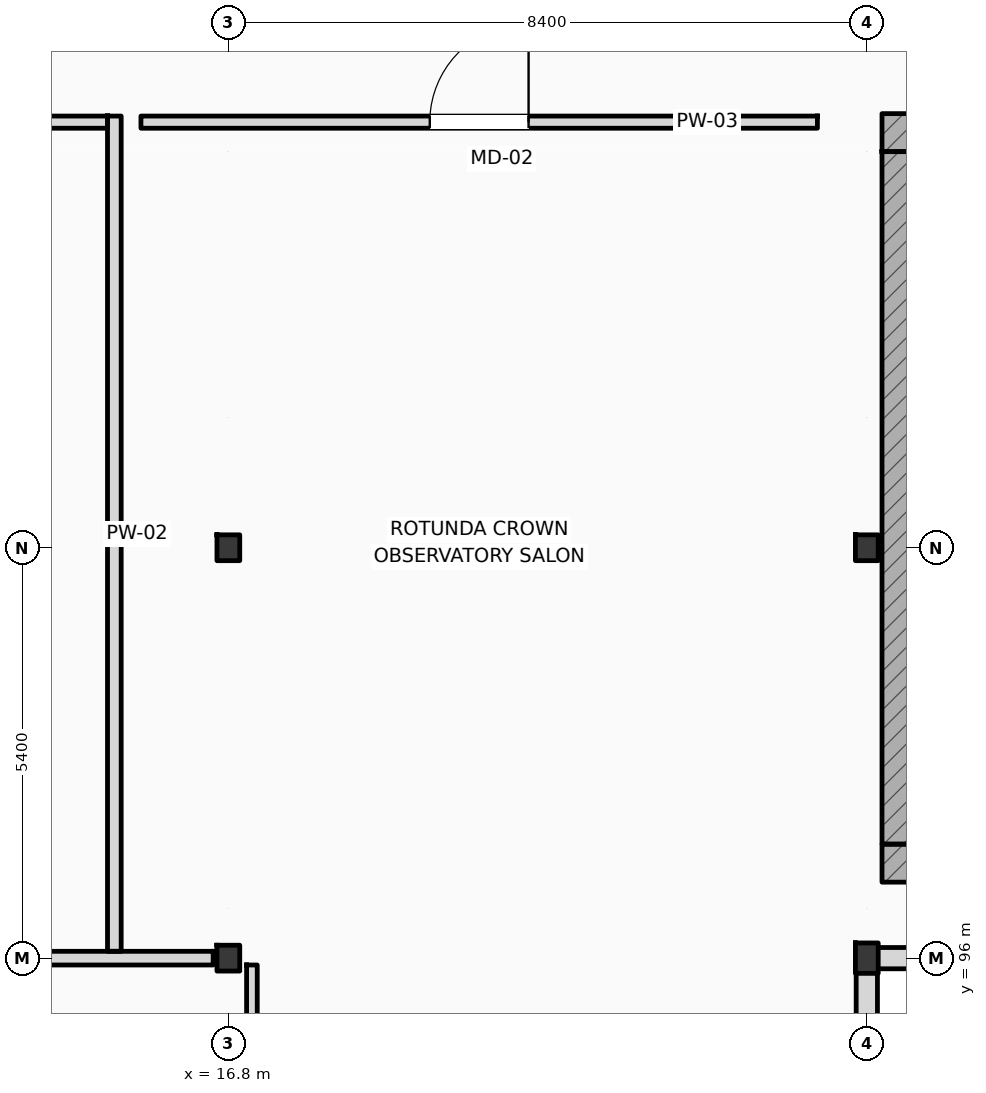
"""IFC4 building model, lengths in metres.
Left out: names, types, materials, properties, quantities, classifications, styles, units other than length and angle.
Written with IfcOpenShell. Run it as: python <this file> out.ifc"""

import sys

from ifc_helpers import new_model, si_unit, direction, frame, frame_2d, origin, origin_2d, place, context, subcontext, project, spatial, rectangle, i_section, extrude, element, fill, save


model = new_model("IFC4")
c1 = context("Model", 3, precision=1e-05, world=origin(), true_north=direction((0.0, 1.0)))
c2 = subcontext(c1, "Body", "Model", "MODEL_VIEW")
j1 = project(units=[si_unit("LENGTHUNIT", "METRE"), si_unit("PLANEANGLEUNIT", "RADIAN")], contexts=[c1])
p1 = place(None, origin())
s1 = spatial("IfcSite", under=j1, at=p1, CompositionType="ELEMENT")
p2 = place(p1, origin())
s2 = spatial("IfcBuilding", under=s1, at=p2, CompositionType="ELEMENT")
p3 = place(p2, frame((0.0, 0.0, 46.8)))
s3 = spatial("IfcBuildingStorey", under=s2, at=p3, CompositionType="ELEMENT", Elevation=46.8)
p4 = place(p3, frame((16.8, 96.0, 0.0), z_axis=(0.0, 0.0, 1.0), x_axis=(1.0, 0.0, 0.0)))
e1 = element("IfcColumn", 1, at=p4, inside=s3, PredefinedType="COLUMN", context=c2, shape_type="SweptSolid", body=[
    extrude(i_section(OverallWidth=0.3, OverallDepth=0.34, WebThickness=0.012, FlangeThickness=0.021, FilletRadius=0.027, at=origin_2d()), origin(), (0.0, 0.0, 1.0), 4.8),
])
p5 = place(p3, frame((25.2, 96.0, 0.0), z_axis=(0.0, 0.0, 1.0), x_axis=(1.0, 0.0, 0.0)))
e2 = element("IfcColumn", 2, at=p5, inside=s3, PredefinedType="COLUMN", context=c2, shape_type="SweptSolid", body=[
    extrude(i_section(OverallWidth=0.3, OverallDepth=0.4, WebThickness=0.013, FlangeThickness=0.024, FilletRadius=0.027, at=origin_2d()), origin(), (0.0, 0.0, 1.0), 4.8),
])
for number, where, z_axis, x_axis in (
    (3, (16.8, 101.4, 0.0), (0.0, 0.0, 1.0), (1.0, 0.0, 0.0)),
    (4, (25.2, 101.4, 0.0), (0.0, 0.0, 1.0), (1.0, 0.0, 0.0)),
):
    element("IfcColumn", number, at=place(p3, frame(where, z_axis=z_axis, x_axis=x_axis)), inside=s3, PredefinedType="COLUMN", context=c2, shape_type="SweptSolid", body=[
        extrude(i_section(OverallWidth=0.3, OverallDepth=0.34, WebThickness=0.012, FlangeThickness=0.021, FilletRadius=0.027, at=origin_2d()), origin(), (0.0, 0.0, 1.0), 4.8),
    ])
for number, where, z_axis, x_axis in (
    (5, (25.4, 106.862, 0.0), (0.0, 0.0, 1.0), (1.0, 0.0, 0.0)),
    (6, (25.4, 97.25, 0.0), (0.0, 0.0, 1.0), (1.0, 0.0, 0.0)),
):
    element("IfcWall", number, at=place(p3, frame(where, z_axis=z_axis, x_axis=x_axis)), inside=s3, PredefinedType="SHEAR", context=c2, shape_type="SweptSolid", body=[
        extrude(rectangle(XDim=5.16, YDim=0.5, at=frame_2d((2.58, 0.0))), origin(), (0.0, 0.0, 1.0), 4.8),
    ])
p6 = place(p3, frame((25.65, 97.5, 0.0), z_axis=(0.0, 0.0, 1.0), x_axis=(0.0, 1.0, 0.0)))
e7 = element("IfcWall", 7, at=p6, inside=s3, PredefinedType="SHEAR", context=c2, shape_type="SweptSolid", body=[
    extrude(rectangle(XDim=9.112, YDim=0.5, at=frame_2d((4.556, 0.0))), origin(), (0.0, 0.0, 1.0), 4.8),
])
p7 = place(p3, frame((25.2, 96.0, 0.0), z_axis=(0.0, 0.0, 1.0), x_axis=(1.0, 0.0, 0.0)))
e8 = element("IfcWall", 8, at=p7, inside=s3, PredefinedType="STANDARD", context=c2, shape_type="SweptSolid", body=[
    extrude(rectangle(XDim=54.6, YDim=0.28, at=frame_2d((27.3, 0.0))), origin(), (0.0, 0.0, 1.0), 4.08),
])
p8 = place(p3, frame((25.2, 79.5, 0.0), z_axis=(0.0, 0.0, 1.0), x_axis=(0.0, 1.0, 0.0)))
e9 = element("IfcWall", 9, at=p8, inside=s3, PredefinedType="STANDARD", context=c2, shape_type="SweptSolid", body=[
    extrude(rectangle(XDim=16.5, YDim=0.28, at=frame_2d((8.25, 0.0))), origin(), (0.0, 0.0, 1.0), 4.17),
])
p9 = place(p3, frame((15.65, 107.0, 0.0), z_axis=(0.0, 0.0, 1.0), x_axis=(1.0, 0.0, 0.0)))
e10 = element("IfcWall", 10, at=p9, inside=s3, PredefinedType="PARTITIONING", context=c2, shape_type="SweptSolid", body=[
    extrude(rectangle(XDim=8.9, YDim=0.16, at=frame_2d((4.45, 0.0))), origin(), (0.0, 0.0, 1.0), 4.54),
])
p10 = place(p9, frame((3.8, 0.0, 0.0)))
e11 = element("IfcOpeningElement", 11, at=p10, cuts=e10, PredefinedType="OPENING", context=c2, shape_type="SweptSolid", body=[
    extrude(rectangle(XDim=1.3, YDim=2.2, at=frame_2d((0.65, 1.1))), frame((0.0, 0.09, 0.0), z_axis=(0.0, -1.0, 0.0), x_axis=(1.0, 0.0, 0.0)), (0.0, 0.0, 1.0), 0.18),
])
p11 = place(p3, frame((10.74, 107.0, 0.0), z_axis=(0.0, 0.0, 1.0), x_axis=(1.0, 0.0, 0.0)))
e12 = element("IfcWall", 12, at=p11, inside=s3, PredefinedType="PARTITIONING", context=c2, shape_type="SweptSolid", body=[
    extrude(rectangle(XDim=4.47, YDim=0.16, at=frame_2d((2.235, 0.0))), origin(), (0.0, 0.0, 1.0), 4.54),
])
p12 = place(p11, frame((1.785, 0.0, 0.0)))
e13 = element("IfcOpeningElement", 13, at=p12, cuts=e12, PredefinedType="OPENING", context=c2, shape_type="SweptSolid", body=[
    extrude(rectangle(XDim=0.9, YDim=2.1, at=frame_2d((0.45, 1.05))), frame((0.0, 0.09, 0.0), z_axis=(0.0, -1.0, 0.0), x_axis=(1.0, 0.0, 0.0)), (0.0, 0.0, 1.0), 0.18),
])
p13 = place(p3, frame((17.11, 91.19, 0.0), z_axis=(0.0, 0.0, 1.0), x_axis=(0.0, 1.0, 0.0)))
e14 = element("IfcWall", 14, at=p13, inside=s3, PredefinedType="PARTITIONING", context=c2, shape_type="SweptSolid", body=[
    extrude(rectangle(XDim=4.72, YDim=0.14, at=frame_2d((2.36, 0.0))), origin(), (0.0, 0.0, 1.0), 4.54),
])
p14 = place(p3, frame((10.65, 96.0, 0.0), z_axis=(0.0, 0.0, 1.0), x_axis=(1.0, 0.0, 0.0)))
e15 = element("IfcWall", 15, at=p14, inside=s3, PredefinedType="PARTITIONING", context=c2, shape_type="SweptSolid", body=[
    extrude(rectangle(XDim=5.95, YDim=0.18, at=frame_2d((2.975, 0.0))), origin(), (0.0, 0.0, 1.0), 3.98),
])
p15 = place(p3, frame((15.3, 96.09, 0.0), z_axis=(0.0, 0.0, 1.0), x_axis=(0.0, 1.0, 0.0)))
e16 = element("IfcWall", 16, at=p15, inside=s3, PredefinedType="PARTITIONING", context=c2, shape_type="SweptSolid", body=[
    extrude(rectangle(XDim=10.99, YDim=0.18, at=frame_2d((5.495, 0.0))), origin(), (0.0, 0.0, 1.0), 4.54),
])
p16 = place(p10, origin())
e17 = element("IfcDoor", 17, at=p16, inside=s3, OperationType="SINGLE_SWING_RIGHT", PredefinedType="DOOR", context=c2, shape_type="SweptSolid", body=[
    extrude(rectangle(XDim=1.3, YDim=2.2, at=frame_2d((0.65, 1.1))), frame((0.0, 0.025, 0.0), z_axis=(0.0, -1.0, 0.0), x_axis=(1.0, 0.0, 0.0)), (0.0, 0.0, 1.0), 0.05),
])
fill(e11, e17)
save(model, sys.argv[1])
